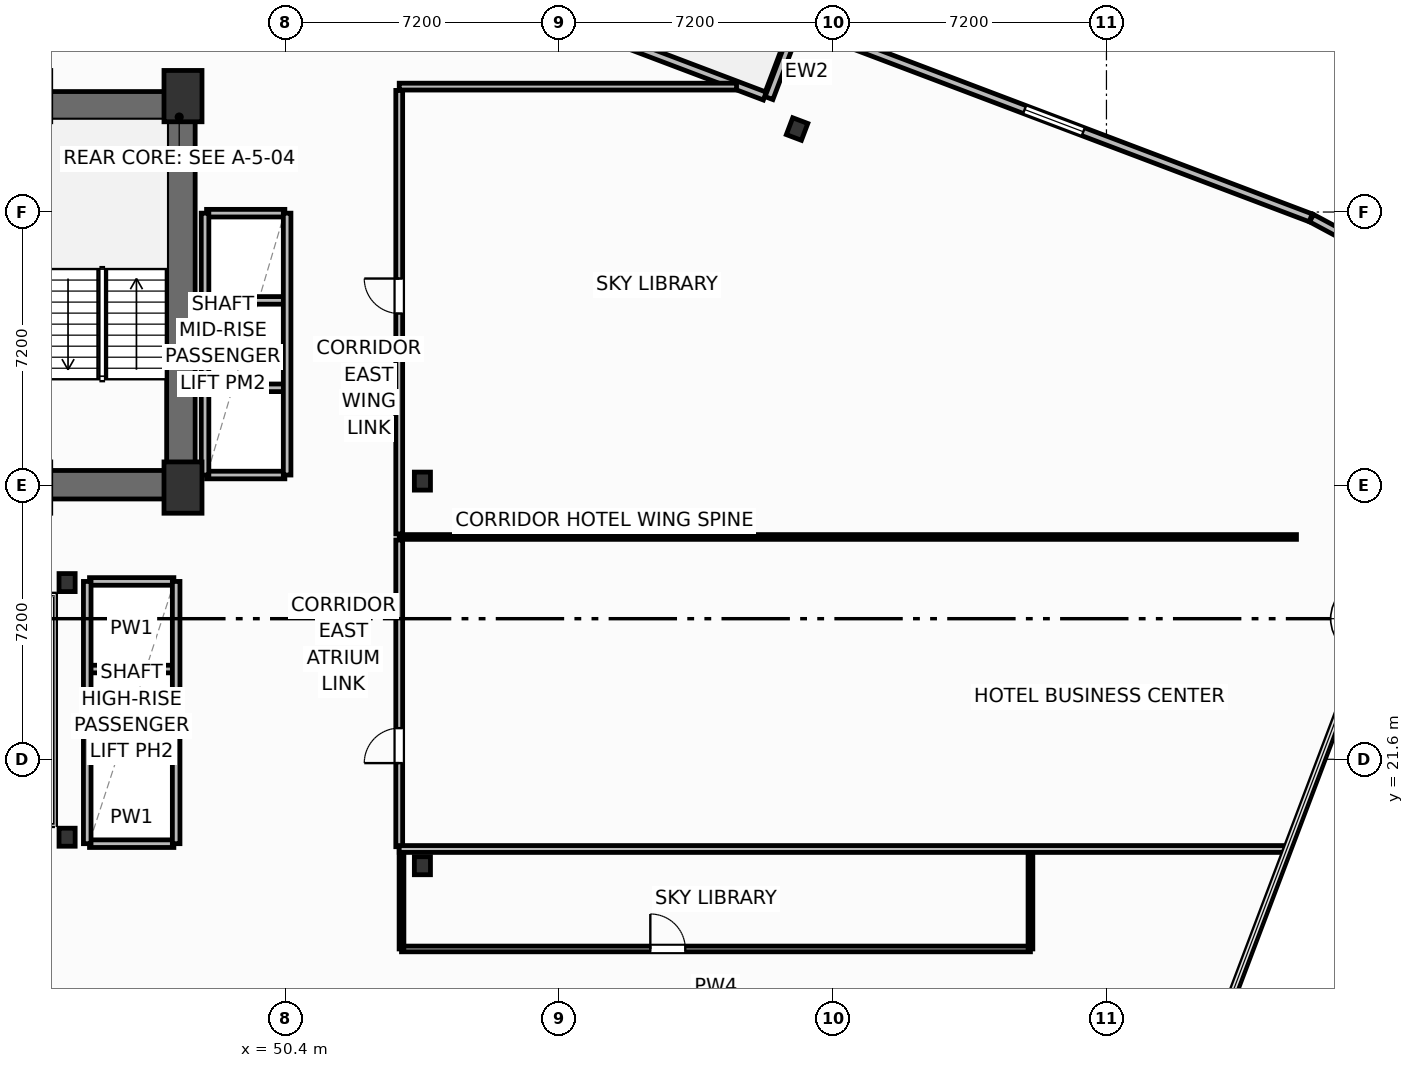
"""IFC4 building model, lengths in metres.
Left out: names, types, materials, properties, quantities, classifications, styles, units other than length and angle.
Written with IfcOpenShell. Run it as: python <this file> out.ifc"""

import sys

from ifc_helpers import new_model, si_unit, direction, frame, frame_2d, origin, origin_2d, place, context, subcontext, project, spatial, rectangle, i_section, extrude, element, fill, save


model = new_model("IFC4")
c1 = context("Model", 3, precision=1e-05, world=origin(), true_north=direction((0.0, 1.0)))
c2 = subcontext(c1, "Body", "Model", "MODEL_VIEW")
j1 = project(units=[si_unit("LENGTHUNIT", "METRE"), si_unit("PLANEANGLEUNIT", "RADIAN")], contexts=[c1])
p1 = place(None, origin())
s1 = spatial("IfcSite", under=j1, at=p1, CompositionType="ELEMENT")
p2 = place(p1, origin())
s2 = spatial("IfcBuilding", under=s1, at=p2, CompositionType="ELEMENT")
p3 = place(p2, frame((0.0, 0.0, 91.0)))
s3 = spatial("IfcBuildingStorey", under=s2, at=p3, CompositionType="ELEMENT", Elevation=91.0)
for number, where, z_axis, x_axis in (
    (1, (47.7, 28.75, 0.0), (0.0, 0.0, 1.0), (1.0, 0.0, 0.0)),
    (2, (47.7, 39.05, 0.0), (0.0, 0.0, 1.0), (1.0, 0.0, 0.0)),
):
    element("IfcColumn", number, at=place(p3, frame(where, z_axis=z_axis, x_axis=x_axis)), inside=s3, PredefinedType="COLUMN", context=c2, shape_type="SweptSolid", body=[
        extrude(rectangle(XDim=1.0, YDim=1.35, at=origin_2d()), origin(), (0.0, 0.0, 1.0), 3.7),
    ])
for number, where, z_axis, x_axis in (
    (3, (44.65, 19.55, 0.0), (0.0, 0.0, 1.0), (1.0, 0.0, 0.0)),
    (4, (44.65, 26.25, 0.0), (0.0, 0.0, 1.0), (1.0, 0.0, 0.0)),
    (5, (54.0, 18.8, 0.0), (0.0, 0.0, 1.0), (1.0, 0.0, 0.0)),
    (6, (54.0, 28.92, 0.0), (0.0, 0.0, 1.0), (1.0, 0.0, 0.0)),
):
    element("IfcColumn", number, at=place(p3, frame(where, z_axis=z_axis, x_axis=x_axis)), inside=s3, PredefinedType="COLUMN", context=c2, shape_type="SweptSolid", body=[
        extrude(i_section(OverallWidth=0.424, OverallDepth=0.474, WebThickness=0.048, FlangeThickness=0.077, FilletRadius=0.025, at=origin_2d()), origin(), (0.0, 0.0, 1.0), 3.7),
    ])
p4 = place(p3, frame((30.38, 38.795, 0.0), z_axis=(0.0, 0.0, 1.0), x_axis=(1.0, 0.0, 0.0)))
e7 = element("IfcWall", 7, at=p4, inside=s3, PredefinedType="SHEAR", context=c2, shape_type="SweptSolid", body=[
    extrude(rectangle(XDim=17.64, YDim=0.75, at=frame_2d((8.82, 0.0))), origin(), (0.0, 0.0, 1.0), 3.45),
])
p5 = place(p3, frame((47.645, 29.2, 0.0), z_axis=(0.0, 0.0, 1.0), x_axis=(0.0, 1.0, 0.0)))
e8 = element("IfcWall", 8, at=p5, inside=s3, PredefinedType="SHEAR", context=c2, shape_type="SweptSolid", body=[
    extrude(rectangle(XDim=9.22, YDim=0.75, at=frame_2d((4.61, 0.0))), origin(), (0.0, 0.0, 1.0), 3.45),
])
p6 = place(p3, frame((43.6, 28.825, 0.0), z_axis=(0.0, 0.0, 1.0), x_axis=(1.0, 0.0, 0.0)))
e9 = element("IfcWall", 9, at=p6, inside=s3, PredefinedType="SHEAR", context=c2, shape_type="SweptSolid", body=[
    extrude(rectangle(XDim=4.42, YDim=0.75, at=frame_2d((2.21, 0.0))), origin(), (0.0, 0.0, 1.0), 3.45),
])
p7 = place(p3, frame((63.859, 38.184, 0.0), z_axis=(0.0, 0.0, 1.0), x_axis=(0.935221751401, -0.354062530786, 0.0)))
e10 = element("IfcColumn", 10, at=p7, inside=s3, PredefinedType="COLUMN", context=c2, shape_type="SweptSolid", body=[
    extrude(i_section(OverallWidth=0.424, OverallDepth=0.474, WebThickness=0.048, FlangeThickness=0.077, FilletRadius=0.025, at=origin_2d()), origin(), (0.0, 0.0, 1.0), 3.7),
])
p8 = place(p3, frame((57.399, 41.175, 0.0), z_axis=(0.0, 0.0, 1.0), x_axis=(0.935227640088, -0.354046976001, 0.0)))
e11 = element("IfcWall", 11, at=p8, inside=s3, PredefinedType="SOLIDWALL", context=c2, shape_type="SweptSolid", body=[
    extrude(rectangle(XDim=6.0, YDim=0.22, at=frame_2d((3.0, 0.0))), origin(), (0.0, 0.0, 1.0), 2.73),
])
p9 = place(p8, frame((0.4, 0.0, 0.0)))
e12 = element("IfcOpeningElement", 12, at=p9, cuts=e11, PredefinedType="OPENING", context=c2, shape_type="SweptSolid", body=[
    extrude(rectangle(XDim=1.5, YDim=2.25, at=frame_2d((0.75, 1.125))), frame((0.0, 0.12, 0.0), z_axis=(0.0, -1.0, 0.0), x_axis=(1.0, 0.0, 0.0)), (0.0, 0.0, 1.0), 0.24),
])
p10 = place(p3, frame((78.597, 35.194, 0.0), z_axis=(0.0, 0.0, 1.0), x_axis=(-0.880948732004, 0.473211719614, 0.0)))
e13 = element("IfcWall", 13, at=p10, inside=s3, PredefinedType="SOLIDWALL", context=c2, shape_type="SweptSolid", body=[
    extrude(rectangle(XDim=1.361, YDim=0.22, at=frame_2d((0.681, 0.0))), origin(), (0.0, 0.0, 1.0), 2.73),
])
p11 = place(p3, frame((77.375, 35.847, 0.0), z_axis=(0.0, 0.0, 1.0), x_axis=(-0.935222448475, 0.354060689526, 0.0)))
e14 = element("IfcWall", 14, at=p11, inside=s3, PredefinedType="SOLIDWALL", context=c2, shape_type="SweptSolid", body=[
    extrude(rectangle(XDim=14.447, YDim=0.22, at=frame_2d((7.224, 0.0))), origin(), (0.0, 0.0, 1.0), 2.73),
])
p12 = place(p11, frame((6.399, 0.0, 0.8)))
e15 = element("IfcOpeningElement", 15, at=p12, cuts=e14, PredefinedType="OPENING", context=c2, shape_type="SweptSolid", body=[
    extrude(rectangle(XDim=1.65, YDim=1.65, at=frame_2d((0.825, 0.825))), frame((0.0, 0.12, 0.0), z_axis=(0.0, -1.0, 0.0), x_axis=(1.0, 0.0, 0.0)), (0.0, 0.0, 1.0), 0.24),
])
p13 = place(p3, frame((63.819, 40.845, 0.0), z_axis=(0.0, 0.0, 1.0), x_axis=(-0.354128791944, -0.935196663123, 0.0)))
e16 = element("IfcWall", 16, at=p13, inside=s3, PredefinedType="SOLIDWALL", context=c2, shape_type="SweptSolid", body=[
    extrude(rectangle(XDim=1.975, YDim=0.22, at=frame_2d((0.988, 0.0))), origin(), (0.0, 0.0, 1.0), 2.73),
])
p14 = place(p3, frame((53.45, 16.61, 0.0), z_axis=(0.0, 0.0, 1.0), x_axis=(1.0, 0.0, 0.0)))
e17 = element("IfcWall", 17, at=p14, inside=s3, PredefinedType="PARTITIONING", context=c2, shape_type="SweptSolid", body=[
    extrude(rectangle(XDim=16.55, YDim=0.15, at=frame_2d((8.275, 0.0))), origin(), (0.0, 0.0, 1.0), 2.58),
])
p15 = place(p14, frame((6.548, 0.0, 0.0)))
e18 = element("IfcOpeningElement", 18, at=p15, cuts=e17, PredefinedType="OPENING", context=c2, shape_type="SweptSolid", body=[
    extrude(rectangle(XDim=0.92, YDim=2.05, at=frame_2d((0.46, 1.025))), frame((0.0, 0.085, 0.0), z_axis=(0.0, -1.0, 0.0), x_axis=(1.0, 0.0, 0.0)), (0.0, 0.0, 1.0), 0.17),
])
p16 = place(p3, frame((53.45, 16.61, 0.0), z_axis=(0.0, 0.0, 1.0), x_axis=(0.0, 1.0, 0.0)))
e19 = element("IfcWall", 19, at=p16, inside=s3, PredefinedType="PARTITIONING", context=c2, shape_type="SweptSolid", body=[
    extrude(rectangle(XDim=2.63, YDim=0.125, at=frame_2d((1.315, 0.0))), origin(), (0.0, 0.0, 1.0), 2.58),
])
p17 = place(p3, frame((70.0, 16.61, 0.0), z_axis=(0.0, 0.0, 1.0), x_axis=(0.0, 1.0, 0.0)))
e20 = element("IfcWall", 20, at=p17, inside=s3, PredefinedType="PARTITIONING", context=c2, shape_type="SweptSolid", body=[
    extrude(rectangle(XDim=2.63, YDim=0.125, at=frame_2d((1.315, 0.0))), origin(), (0.0, 0.0, 1.0), 2.824),
])
p18 = place(p3, frame((53.39, 19.3, 0.0), z_axis=(0.0, 0.0, 1.0), x_axis=(0.0, 1.0, 0.0)))
e21 = element("IfcWall", 21, at=p18, inside=s3, PredefinedType="PARTITIONING", context=c2, shape_type="SweptSolid", body=[
    extrude(rectangle(XDim=8.07, YDim=0.18, at=frame_2d((4.035, 0.0))), origin(), (0.0, 0.0, 1.0), 3.45),
])
p19 = place(p18, frame((2.2, 0.0, 0.0)))
e22 = element("IfcOpeningElement", 22, at=p19, cuts=e21, PredefinedType="OPENING", context=c2, shape_type="SweptSolid", body=[
    extrude(rectangle(XDim=0.92, YDim=2.05, at=frame_2d((0.46, 1.025))), frame((0.0, 0.1, 0.0), z_axis=(0.0, -1.0, 0.0), x_axis=(1.0, 0.0, 0.0)), (0.0, 0.0, 1.0), 0.2),
])
p20 = place(p3, frame((53.39, 27.53, 0.0), z_axis=(0.0, 0.0, 1.0), x_axis=(0.0, 1.0, 0.0)))
e23 = element("IfcWall", 23, at=p20, inside=s3, PredefinedType="PARTITIONING", context=c2, shape_type="SweptSolid", body=[
    extrude(rectangle(XDim=11.67, YDim=0.18, at=frame_2d((5.835, 0.0))), origin(), (0.0, 0.0, 1.0), 3.45),
])
p21 = place(p20, frame((5.8, 0.0, 0.0)))
e24 = element("IfcOpeningElement", 24, at=p21, cuts=e23, PredefinedType="OPENING", context=c2, shape_type="SweptSolid", body=[
    extrude(rectangle(XDim=0.92, YDim=2.05, at=frame_2d((0.46, 1.025))), frame((0.0, 0.1, 0.0), z_axis=(0.0, -1.0, 0.0), x_axis=(1.0, 0.0, 0.0)), (0.0, 0.0, 1.0), 0.2),
])
p22 = place(p3, frame((53.39, 27.45, 0.0), z_axis=(0.0, 0.0, 1.0), x_axis=(1.0, 0.0, 0.0)))
e25 = element("IfcWall", 25, at=p22, inside=s3, PredefinedType="PARTITIONING", context=c2, shape_type="SweptSolid", body=[
    extrude(rectangle(XDim=23.61, YDim=0.125, at=frame_2d((11.805, 0.0))), origin(), (0.0, 0.0, 1.0), 3.45),
])
p23 = place(p3, frame((53.39, 19.24, 0.0), z_axis=(0.0, 0.0, 1.0), x_axis=(1.0, 0.0, 0.0)))
e26 = element("IfcWall", 26, at=p23, inside=s3, PredefinedType="PARTITIONING", context=c2, shape_type="SweptSolid", body=[
    extrude(rectangle(XDim=23.317, YDim=0.18, at=frame_2d((11.658, 0.0))), origin(), (0.0, 0.0, 1.0), 3.45),
])
p24 = place(p3, frame((53.39, 39.3, 0.0), z_axis=(0.0, 0.0, 1.0), x_axis=(1.0, 0.0, 0.0)))
e27 = element("IfcWall", 27, at=p24, inside=s3, PredefinedType="PARTITIONING", context=c2, shape_type="SweptSolid", body=[
    extrude(rectangle(XDim=8.876, YDim=0.18, at=frame_2d((4.438, 0.0))), origin(), (0.0, 0.0, 1.0), 3.45),
])
for number, where, z_axis, x_axis in (
    (28, (48.32, 31.375, 0.0), (0.0, 0.0, 1.0), (1.0, 0.0, 0.0)),
    (29, (48.32, 33.675, 0.0), (0.0, 0.0, 1.0), (1.0, 0.0, 0.0)),
):
    element("IfcWall", number, at=place(p3, frame(where, z_axis=z_axis, x_axis=x_axis)), inside=s3, PredefinedType="PARTITIONING", context=c2, shape_type="SweptSolid", body=[
        extrude(rectangle(XDim=2.06, YDim=0.2, at=frame_2d((1.03, 0.0))), origin(), (0.0, 0.0, 1.0), 3.45),
    ])
p25 = place(p3, frame((48.32, 29.08, 0.0), z_axis=(0.0, 0.0, 1.0), x_axis=(1.0, 0.0, 0.0)))
e30 = element("IfcWall", 30, at=p25, inside=s3, PredefinedType="PARTITIONING", context=c2, shape_type="SweptSolid", body=[
    extrude(rectangle(XDim=2.06, YDim=0.2, at=frame_2d((1.03, 0.0))), origin(), (0.0, 0.0, 1.0), 2.662),
])
p26 = place(p3, frame((48.32, 35.97, 0.0), z_axis=(0.0, 0.0, 1.0), x_axis=(1.0, 0.0, 0.0)))
e31 = element("IfcWall", 31, at=p26, inside=s3, PredefinedType="PARTITIONING", context=c2, shape_type="SweptSolid", body=[
    extrude(rectangle(XDim=2.06, YDim=0.2, at=frame_2d((1.03, 0.0))), origin(), (0.0, 0.0, 1.0), 3.45),
])
for number, where, z_axis, x_axis in (
    (32, (48.28, 29.08, 0.0), (0.0, 0.0, 1.0), (0.0, 1.0, 0.0)),
    (33, (50.44, 29.08, 0.0), (0.0, 0.0, 1.0), (0.0, 1.0, 0.0)),
):
    element("IfcWall", number, at=place(p3, frame(where, z_axis=z_axis, x_axis=x_axis)), inside=s3, PredefinedType="PARTITIONING", context=c2, shape_type="SweptSolid", body=[
        extrude(rectangle(XDim=6.89, YDim=0.2, at=frame_2d((3.445, 0.0))), origin(), (0.0, 0.0, 1.0), 3.45),
    ])
for number, where, z_axis, x_axis in (
    (34, (45.24, 21.675, 0.0), (0.0, 0.0, 1.0), (1.0, 0.0, 0.0)),
    (35, (45.24, 23.975, 0.0), (0.0, 0.0, 1.0), (1.0, 0.0, 0.0)),
):
    element("IfcWall", number, at=place(p3, frame(where, z_axis=z_axis, x_axis=x_axis)), inside=s3, PredefinedType="PARTITIONING", context=c2, shape_type="SweptSolid", body=[
        extrude(rectangle(XDim=2.22, YDim=0.2, at=frame_2d((1.11, 0.0))), origin(), (0.0, 0.0, 1.0), 3.45),
    ])
p27 = place(p3, frame((45.24, 19.38, 0.0), z_axis=(0.0, 0.0, 1.0), x_axis=(1.0, 0.0, 0.0)))
e36 = element("IfcWall", 36, at=p27, inside=s3, PredefinedType="PARTITIONING", context=c2, shape_type="SweptSolid", body=[
    extrude(rectangle(XDim=2.22, YDim=0.2, at=frame_2d((1.11, 0.0))), origin(), (0.0, 0.0, 1.0), 2.662),
])
p28 = place(p3, frame((45.24, 26.28, 0.0), z_axis=(0.0, 0.0, 1.0), x_axis=(1.0, 0.0, 0.0)))
e37 = element("IfcWall", 37, at=p28, inside=s3, PredefinedType="PARTITIONING", context=c2, shape_type="SweptSolid", body=[
    extrude(rectangle(XDim=2.22, YDim=0.2, at=frame_2d((1.11, 0.0))), origin(), (0.0, 0.0, 1.0), 3.45),
])
for number, where, z_axis, x_axis in (
    (38, (45.18, 19.38, 0.0), (0.0, 0.0, 1.0), (0.0, 1.0, 0.0)),
    (39, (47.52, 19.38, 0.0), (0.0, 0.0, 1.0), (0.0, 1.0, 0.0)),
):
    element("IfcWall", number, at=place(p3, frame(where, z_axis=z_axis, x_axis=x_axis)), inside=s3, PredefinedType="PARTITIONING", context=c2, shape_type="SweptSolid", body=[
        extrude(rectangle(XDim=6.9, YDim=0.2, at=frame_2d((3.45, 0.0))), origin(), (0.0, 0.0, 1.0), 3.45),
    ])
p29 = place(p12, origin())
e40 = element("IfcWindow", 40, at=p29, inside=s3, PartitioningType="SINGLE_PANEL", PredefinedType="WINDOW", context=c2, shape_type="SweptSolid", body=[
    extrude(rectangle(XDim=1.65, YDim=1.65, at=frame_2d((0.825, 0.825))), frame((0.0, 0.03, 0.0), z_axis=(0.0, -1.0, 0.0), x_axis=(1.0, 0.0, 0.0)), (0.0, 0.0, 1.0), 0.06),
])
fill(e15, e40)
p30 = place(p15, origin())
e41 = element("IfcDoor", 41, at=p30, inside=s3, OperationType="SINGLE_SWING_LEFT", PredefinedType="DOOR", context=c2, shape_type="SweptSolid", body=[
    extrude(rectangle(XDim=0.92, YDim=2.05, at=frame_2d((0.46, 1.025))), frame((0.0, 0.025, 0.0), z_axis=(0.0, -1.0, 0.0), x_axis=(1.0, 0.0, 0.0)), (0.0, 0.0, 1.0), 0.05),
])
fill(e18, e41)
p31 = place(p19, origin())
e42 = element("IfcDoor", 42, at=p31, inside=s3, OperationType="SINGLE_SWING_LEFT", PredefinedType="DOOR", context=c2, shape_type="SweptSolid", body=[
    extrude(rectangle(XDim=0.92, YDim=2.05, at=frame_2d((0.46, 1.025))), frame((0.0, 0.025, 0.0), z_axis=(0.0, -1.0, 0.0), x_axis=(1.0, 0.0, 0.0)), (0.0, 0.0, 1.0), 0.05),
])
fill(e22, e42)
p32 = place(p21, origin())
e43 = element("IfcDoor", 43, at=p32, inside=s3, OperationType="SINGLE_SWING_RIGHT", PredefinedType="DOOR", context=c2, shape_type="SweptSolid", body=[
    extrude(rectangle(XDim=0.92, YDim=2.05, at=frame_2d((0.46, 1.025))), frame((0.0, 0.025, 0.0), z_axis=(0.0, -1.0, 0.0), x_axis=(1.0, 0.0, 0.0)), (0.0, 0.0, 1.0), 0.05),
])
fill(e24, e43)
save(model, sys.argv[1])
